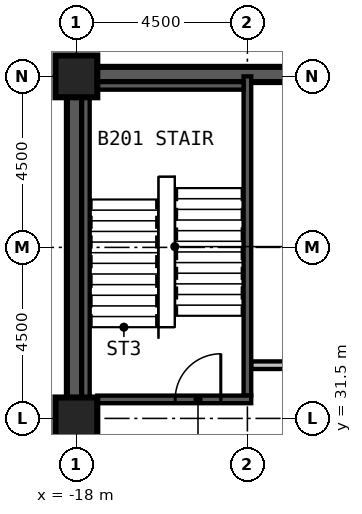
"""IFC4 building model, lengths in metres.
Left out: names, types, materials, properties, quantities, classifications, styles, units other than length and angle.
Written with IfcOpenShell. Run it as: python <this file> out.ifc"""

import sys

from ifc_helpers import new_model, si_unit, direction, frame, frame_2d, origin, origin_2d, place, context, subcontext, project, spatial, rectangle, extrude, element, fill, save


model = new_model("IFC4")
c1 = context("Model", 3, precision=1e-05, world=origin(), true_north=direction((0.0, 1.0)))
c2 = subcontext(c1, "Body", "Model", "MODEL_VIEW")
j1 = project(units=[si_unit("LENGTHUNIT", "METRE"), si_unit("PLANEANGLEUNIT", "RADIAN")], contexts=[c1])
p1 = place(None, origin())
s1 = spatial("IfcSite", under=j1, at=p1, CompositionType="ELEMENT")
p2 = place(p1, origin())
s2 = spatial("IfcBuilding", under=s1, at=p2, CompositionType="ELEMENT")
p3 = place(p2, frame((0.0, 0.0, -9.0)))
s3 = spatial("IfcBuildingStorey", under=s2, at=p3, CompositionType="ELEMENT", Elevation=-9.0)
for number, where, z_axis, x_axis in (
    (1, (-18.0, 31.5, -0.6), (0.0, 0.0, 1.0), (1.0, 0.0, 0.0)),
    (2, (-18.0, 40.5, -0.6), (0.0, 0.0, 1.0), (1.0, 0.0, 0.0)),
):
    element("IfcColumn", number, at=place(p3, frame(where, z_axis=z_axis, x_axis=x_axis)), inside=s3, PredefinedType="COLUMN", context=c2, shape_type="SweptSolid", body=[
        extrude(rectangle(XDim=1.1, YDim=1.1, at=origin_2d()), origin(), (0.0, 0.0, 1.0), 5.1),
    ])
p4 = place(p3, frame((58.75, 40.55, -0.6), z_axis=(0.0, 0.0, 1.0), x_axis=(-1.0, 0.0, 0.0)))
e3 = element("IfcWall", 3, at=p4, inside=s3, PredefinedType="SOLIDWALL", context=c2, shape_type="SweptSolid", body=[
    extrude(rectangle(XDim=77.0, YDim=0.4, at=frame_2d((38.5, 0.0))), origin(), (0.0, 0.0, 1.0), 5.1),
])
p5 = place(p3, frame((-18.05, 40.35, -0.6), z_axis=(0.0, 0.0, 1.0), x_axis=(0.0, -1.0, 0.0)))
e4 = element("IfcWall", 4, at=p5, inside=s3, PredefinedType="SOLIDWALL", context=c2, shape_type="SweptSolid", body=[
    extrude(rectangle(XDim=53.7, YDim=0.4, at=frame_2d((26.85, 0.0))), origin(), (0.0, 0.0, 1.0), 5.1),
])
p6 = place(p3, frame((-17.45, 32.0, 0.0), z_axis=(0.0, 0.0, 1.0), x_axis=(1.0, 0.0, 0.0)))
e5 = element("IfcWall", 5, at=p6, inside=s3, PredefinedType="SOLIDWALL", context=c2, shape_type="SweptSolid", body=[
    extrude(rectangle(XDim=4.05, YDim=0.2, at=frame_2d((2.025, 0.0))), origin(), (0.0, 0.0, 1.0), 2.6),
])
p7 = place(p6, frame((2.05, 0.0, 0.0)))
e6 = element("IfcOpeningElement", 6, at=p7, cuts=e5, PredefinedType="OPENING", context=c2, shape_type="SweptSolid", body=[
    extrude(rectangle(XDim=1.2, YDim=2.1, at=frame_2d((0.6, 1.05))), frame((0.0, 0.11, 0.0), z_axis=(0.0, -1.0, 0.0), x_axis=(1.0, 0.0, 0.0)), (0.0, 0.0, 1.0), 0.22),
])
p8 = place(p3, frame((-13.5, 32.1, 0.0), z_axis=(0.0, 0.0, 1.0), x_axis=(0.0, 1.0, 0.0)))
e7 = element("IfcWall", 7, at=p8, inside=s3, PredefinedType="SOLIDWALL", context=c2, shape_type="SweptSolid", body=[
    extrude(rectangle(XDim=8.4, YDim=0.2, at=frame_2d((4.2, 0.0))), origin(), (0.0, 0.0, 1.0), 4.25),
])
p9 = place(p3, frame((-17.75, 32.05, 0.0), z_axis=(0.0, 0.0, 1.0), x_axis=(0.0, 1.0, 0.0)))
e8 = element("IfcWall", 8, at=p9, inside=s3, PredefinedType="SOLIDWALL", context=c2, shape_type="SweptSolid", body=[
    extrude(rectangle(XDim=7.9, YDim=0.2, at=frame_2d((3.95, 0.0))), origin(), (0.0, 0.0, 1.0), 4.25),
])
p10 = place(p3, frame((-17.45, 40.25, 0.0), z_axis=(0.0, 0.0, 1.0), x_axis=(1.0, 0.0, 0.0)))
e9 = element("IfcWall", 9, at=p10, inside=s3, PredefinedType="SOLIDWALL", context=c2, shape_type="SweptSolid", body=[
    extrude(rectangle(XDim=3.85, YDim=0.2, at=frame_2d((1.925, 0.0))), origin(), (0.0, 0.0, 1.0), 4.25),
])
p11 = place(p3, frame((-13.4, 32.9, 0.0), z_axis=(0.0, 0.0, 1.0), x_axis=(1.0, 0.0, 0.0)))
e10 = element("IfcWall", 10, at=p11, inside=s3, PredefinedType="PARTITIONING", context=c2, shape_type="SweptSolid", body=[
    extrude(rectangle(XDim=57.5, YDim=0.2, at=frame_2d((28.75, 0.0))), origin(), (0.0, 0.0, 1.0), 4.25),
])
p12 = place(p11, frame((1.5, 0.0, 0.0)))
e11 = element("IfcOpeningElement", 11, at=p12, cuts=e10, PredefinedType="OPENING", context=c2, shape_type="SweptSolid", body=[
    extrude(rectangle(XDim=1.2, YDim=2.1, at=frame_2d((0.6, 1.05))), frame((0.0, 0.11, 0.0), z_axis=(0.0, -1.0, 0.0), x_axis=(1.0, 0.0, 0.0)), (0.0, 0.0, 1.0), 0.22),
])
p13 = place(p11, frame((25.3, 0.0, 0.0)))
e12 = element("IfcOpeningElement", 12, at=p13, cuts=e10, PredefinedType="OPENING", context=c2, shape_type="SweptSolid", body=[
    extrude(rectangle(XDim=1.2, YDim=2.1, at=frame_2d((0.6, 1.05))), frame((0.0, 0.11, 0.0), z_axis=(0.0, -1.0, 0.0), x_axis=(1.0, 0.0, 0.0)), (0.0, 0.0, 1.0), 0.22),
])
p14 = place(p11, frame((43.3, 0.0, 0.0)))
e13 = element("IfcOpeningElement", 13, at=p14, cuts=e10, PredefinedType="OPENING", context=c2, shape_type="SweptSolid", body=[
    extrude(rectangle(XDim=1.2, YDim=2.1, at=frame_2d((0.6, 1.05))), frame((0.0, 0.11, 0.0), z_axis=(0.0, -1.0, 0.0), x_axis=(1.0, 0.0, 0.0)), (0.0, 0.0, 1.0), 0.22),
])
p15 = place(p7, origin())
e14 = element("IfcDoor", 14, at=p15, inside=s3, OperationType="SINGLE_SWING_RIGHT", PredefinedType="DOOR", context=c2, shape_type="SweptSolid", body=[
    extrude(rectangle(XDim=1.2, YDim=2.1, at=frame_2d((0.6, 1.05))), frame((0.0, 0.025, 0.0), z_axis=(0.0, -1.0, 0.0), x_axis=(1.0, 0.0, 0.0)), (0.0, 0.0, 1.0), 0.05),
])
fill(e6, e14)
save(model, sys.argv[1])
